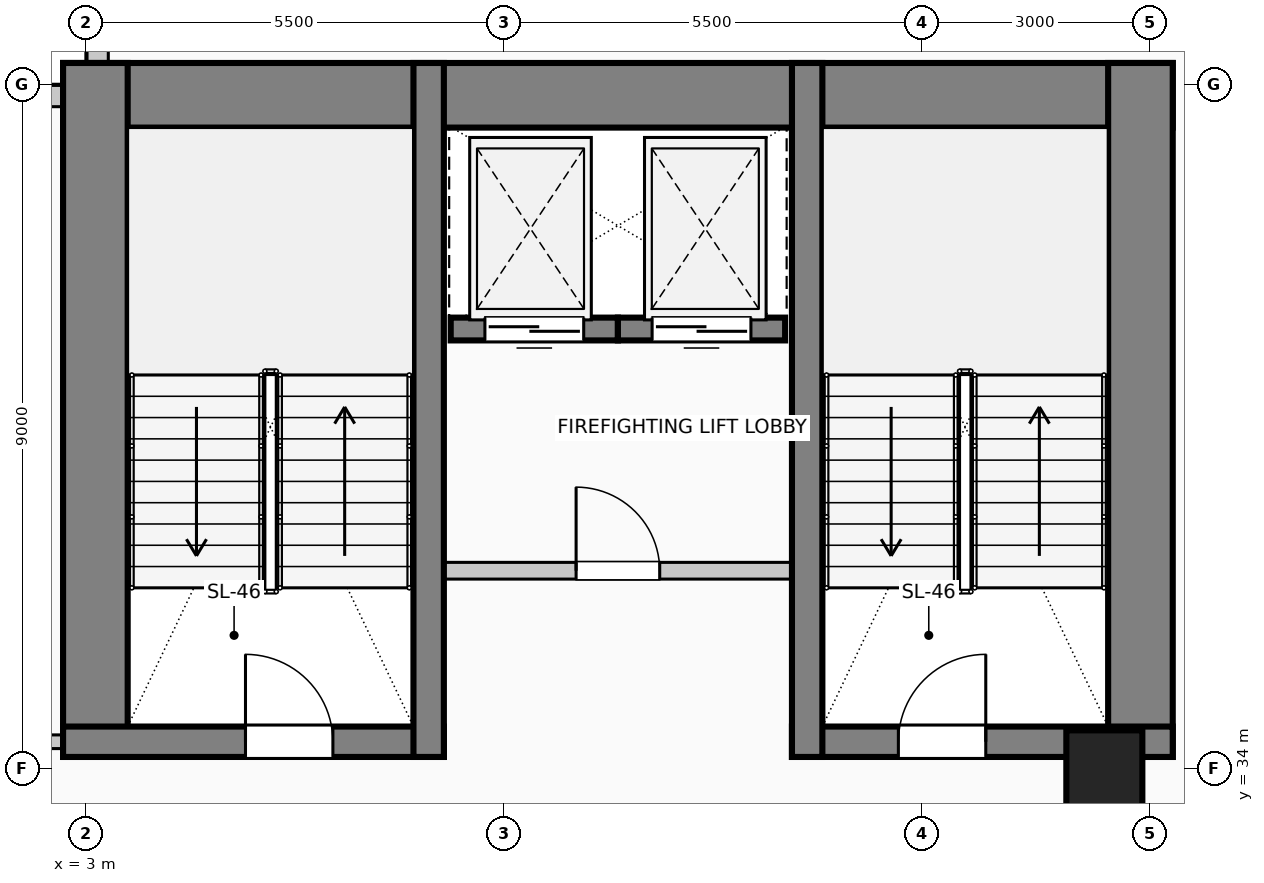
"""IFC4 building model, lengths in metres.
Left out: names, types, materials, properties, quantities, classifications, styles, units other than length and angle.
Written with IfcOpenShell. Run it as: python <this file> out.ifc"""

import sys

from ifc_helpers import new_model, si_unit, direction, frame, frame_2d, origin, origin_2d, place, context, subcontext, project, spatial, rectangle, circle, extrude, element, fill, save


model = new_model("IFC4")
c1 = context("Model", 3, precision=1e-05, world=origin(), true_north=direction((0.0, 1.0)))
c2 = subcontext(c1, "Body", "Model", "MODEL_VIEW")
j1 = project(units=[si_unit("LENGTHUNIT", "METRE"), si_unit("PLANEANGLEUNIT", "RADIAN")], contexts=[c1])
p1 = place(None, origin())
s1 = spatial("IfcSite", under=j1, at=p1, CompositionType="ELEMENT")
p2 = place(p1, origin())
s2 = spatial("IfcBuilding", under=s1, at=p2, CompositionType="ELEMENT")
p3 = place(p2, frame((0.0, 0.0, 92.6)))
s3 = spatial("IfcBuildingStorey", under=s2, at=p3, CompositionType="ELEMENT", Elevation=92.6)
p4 = place(p3, frame((2.7, 42.855, 0.0), z_axis=(0.0, 0.0, 1.0), x_axis=(1.0, 0.0, 0.0)))
e1 = element("IfcWall", 1, at=p4, inside=s3, PredefinedType="SHEAR", context=c2, shape_type="SweptSolid", body=[
    extrude(rectangle(XDim=14.6, YDim=0.85, at=frame_2d((7.3, 0.0))), origin(), (0.0, 0.0, 1.0), 4.0),
])
for number, where, z_axis, x_axis in (
    (2, (3.125, 34.15, 0.0), (0.0, 0.0, 1.0), (0.0, 1.0, 0.0)),
    (3, (16.875, 34.15, 0.0), (0.0, 0.0, 1.0), (0.0, 1.0, 0.0)),
):
    element("IfcWall", number, at=place(p3, frame(where, z_axis=z_axis, x_axis=x_axis)), inside=s3, PredefinedType="SHEAR", context=c2, shape_type="SweptSolid", body=[
        extrude(rectangle(XDim=9.13, YDim=0.85, at=frame_2d((4.565, 0.0))), origin(), (0.0, 0.0, 1.0), 4.0),
    ])
p5 = place(p3, frame((2.7, 34.35, 0.0), z_axis=(0.0, 0.0, 1.0), x_axis=(1.0, 0.0, 0.0)))
e4 = element("IfcWall", 4, at=p5, inside=s3, PredefinedType="SHEAR", context=c2, shape_type="SweptSolid", body=[
    extrude(rectangle(XDim=5.01, YDim=0.4, at=frame_2d((2.505, 0.0))), origin(), (0.0, 0.0, 1.0), 4.0),
])
p6 = place(p5, frame((2.4, 0.0, 0.0)))
e5 = element("IfcOpeningElement", 5, at=p6, cuts=e4, PredefinedType="OPENING", context=c2, shape_type="SweptSolid", body=[
    extrude(rectangle(XDim=1.15, YDim=2.2, at=frame_2d((0.575, 1.1))), frame((0.0, 0.21, 0.0), z_axis=(0.0, -1.0, 0.0), x_axis=(1.0, 0.0, 0.0)), (0.0, 0.0, 1.0), 0.42),
])
p7 = place(p3, frame((12.29, 34.35, 0.0), z_axis=(0.0, 0.0, 1.0), x_axis=(1.0, 0.0, 0.0)))
e6 = element("IfcWall", 6, at=p7, inside=s3, PredefinedType="SHEAR", context=c2, shape_type="SweptSolid", body=[
    extrude(rectangle(XDim=5.01, YDim=0.4, at=frame_2d((2.505, 0.0))), origin(), (0.0, 0.0, 1.0), 4.0),
])
p8 = place(p7, frame((1.4, 0.0, 0.0)))
e7 = element("IfcOpeningElement", 7, at=p8, cuts=e6, PredefinedType="OPENING", context=c2, shape_type="SweptSolid", body=[
    extrude(rectangle(XDim=1.15, YDim=2.2, at=frame_2d((0.575, 1.1))), frame((0.0, 0.21, 0.0), z_axis=(0.0, -1.0, 0.0), x_axis=(1.0, 0.0, 0.0)), (0.0, 0.0, 1.0), 0.42),
])
for number, where, z_axis, x_axis in (
    (8, (7.51, 34.15, 0.0), (0.0, 0.0, 1.0), (0.0, 1.0, 0.0)),
    (9, (12.49, 34.15, 0.0), (0.0, 0.0, 1.0), (0.0, 1.0, 0.0)),
):
    element("IfcWall", number, at=place(p3, frame(where, z_axis=z_axis, x_axis=x_axis)), inside=s3, PredefinedType="SHEAR", context=c2, shape_type="SweptSolid", body=[
        extrude(rectangle(XDim=9.13, YDim=0.4, at=frame_2d((4.565, 0.0))), origin(), (0.0, 0.0, 1.0), 4.0),
    ])
p9 = place(p3, frame((16.4, 34.0, 0.0), z_axis=(0.0, 0.0, 1.0), x_axis=(1.0, 0.0, 0.0)))
e10 = element("IfcColumn", 10, at=p9, inside=s3, PredefinedType="COLUMN", context=c2, shape_type="SweptSolid", body=[
    extrude(circle(Radius=0.5, at=origin_2d()), origin(), (0.0, 0.0, 1.0), 4.0),
])
p10 = place(p3, frame((0.6, 42.845, 0.0), z_axis=(0.0, 0.0, 1.0), x_axis=(1.0, 0.0, 0.0)))
e11 = element("IfcWall", 11, at=p10, inside=s3, PredefinedType="SOLIDWALL", context=c2, shape_type="SweptSolid", body=[
    extrude(rectangle(XDim=2.095, YDim=0.28, at=frame_2d((1.047, 0.0))), origin(), (0.0, 0.0, 1.0), 3.725),
])
p11 = place(p3, frame((3.155, 43.285, 0.0), z_axis=(0.0, 0.0, 1.0), x_axis=(0.0, 1.0, 0.0)))
e12 = element("IfcWall", 12, at=p11, inside=s3, PredefinedType="SOLIDWALL", context=c2, shape_type="SweptSolid", body=[
    extrude(rectangle(XDim=2.115, YDim=0.28, at=frame_2d((1.058, 0.0))), origin(), (0.0, 0.0, 1.0), 3.725),
])
p12 = place(p3, frame((10.0, 39.78, 0.0), z_axis=(0.0, 0.0, 1.0), x_axis=(-1.0, 0.0, 0.0)))
e13 = element("IfcWall", 13, at=p12, inside=s3, PredefinedType="SOLIDWALL", context=c2, shape_type="SweptSolid", body=[
    extrude(rectangle(XDim=2.2, YDim=0.3, at=frame_2d((1.1, 0.0))), origin(), (0.0, 0.0, 1.0), 4.0),
])
p13 = place(p12, frame((0.45, 0.0, 0.0)))
e14 = element("IfcOpeningElement", 14, at=p13, cuts=e13, PredefinedType="OPENING", context=c2, shape_type="SweptSolid", body=[
    extrude(rectangle(XDim=1.3, YDim=2.25, at=frame_2d((0.65, 1.125))), frame((0.0, 0.16, 0.0), z_axis=(0.0, -1.0, 0.0), x_axis=(1.0, 0.0, 0.0)), (0.0, 0.0, 1.0), 0.32),
])
p14 = place(p3, frame((12.2, 39.78, 0.0), z_axis=(0.0, 0.0, 1.0), x_axis=(-1.0, 0.0, 0.0)))
e15 = element("IfcWall", 15, at=p14, inside=s3, PredefinedType="SOLIDWALL", context=c2, shape_type="SweptSolid", body=[
    extrude(rectangle(XDim=2.2, YDim=0.3, at=frame_2d((1.1, 0.0))), origin(), (0.0, 0.0, 1.0), 4.0),
])
p15 = place(p14, frame((0.45, 0.0, 0.0)))
e16 = element("IfcOpeningElement", 16, at=p15, cuts=e15, PredefinedType="OPENING", context=c2, shape_type="SweptSolid", body=[
    extrude(rectangle(XDim=1.3, YDim=2.25, at=frame_2d((0.65, 1.125))), frame((0.0, 0.16, 0.0), z_axis=(0.0, -1.0, 0.0), x_axis=(1.0, 0.0, 0.0)), (0.0, 0.0, 1.0), 0.32),
])
p16 = place(p3, frame((7.51, 36.6, 0.0), z_axis=(0.0, 0.0, 1.0), x_axis=(1.0, 0.0, 0.0)))
e17 = element("IfcWall", 17, at=p16, inside=s3, PredefinedType="PARTITIONING", context=c2, shape_type="SweptSolid", body=[
    extrude(rectangle(XDim=4.98, YDim=0.22, at=frame_2d((2.49, 0.0))), origin(), (0.0, 0.0, 1.0), 3.725),
])
p17 = place(p16, frame((1.94, 0.0, 0.0)))
e18 = element("IfcOpeningElement", 18, at=p17, cuts=e17, PredefinedType="OPENING", context=c2, shape_type="SweptSolid", body=[
    extrude(rectangle(XDim=1.1, YDim=2.2, at=frame_2d((0.55, 1.1))), frame((0.0, 0.12, 0.0), z_axis=(0.0, -1.0, 0.0), x_axis=(1.0, 0.0, 0.0)), (0.0, 0.0, 1.0), 0.24),
])
p18 = place(p3, frame((1.175, 34.35, 0.0), z_axis=(0.0, 0.0, 1.0), x_axis=(1.0, 0.0, 0.0)))
e19 = element("IfcWall", 19, at=p18, inside=s3, PredefinedType="PARTITIONING", context=c2, shape_type="SweptSolid", body=[
    extrude(rectangle(XDim=1.525, YDim=0.18, at=frame_2d((0.762, 0.0))), origin(), (0.0, 0.0, 1.0), 3.725),
])
p19 = place(p13, origin())
e20 = element("IfcDoor", 20, at=p19, inside=s3, OperationType="SLIDING_TO_LEFT", PredefinedType="DOOR", context=c2, shape_type="SweptSolid", body=[
    extrude(rectangle(XDim=1.3, YDim=2.25, at=frame_2d((0.65, 1.125))), frame((0.0, 0.025, 0.0), z_axis=(0.0, -1.0, 0.0), x_axis=(1.0, 0.0, 0.0)), (0.0, 0.0, 1.0), 0.05),
])
fill(e14, e20)
p20 = place(p15, origin())
e21 = element("IfcDoor", 21, at=p20, inside=s3, OperationType="SLIDING_TO_RIGHT", PredefinedType="DOOR", context=c2, shape_type="SweptSolid", body=[
    extrude(rectangle(XDim=1.3, YDim=2.25, at=frame_2d((0.65, 1.125))), frame((0.0, 0.025, 0.0), z_axis=(0.0, -1.0, 0.0), x_axis=(1.0, 0.0, 0.0)), (0.0, 0.0, 1.0), 0.05),
])
fill(e16, e21)
p21 = place(p6, origin())
e22 = element("IfcDoor", 22, at=p21, inside=s3, OperationType="SINGLE_SWING_LEFT", PredefinedType="DOOR", context=c2, shape_type="SweptSolid", body=[
    extrude(rectangle(XDim=1.15, YDim=2.2, at=frame_2d((0.575, 1.1))), frame((0.0, 0.025, 0.0), z_axis=(0.0, -1.0, 0.0), x_axis=(1.0, 0.0, 0.0)), (0.0, 0.0, 1.0), 0.05),
])
fill(e5, e22)
p22 = place(p8, origin())
e23 = element("IfcDoor", 23, at=p22, inside=s3, OperationType="SINGLE_SWING_RIGHT", PredefinedType="DOOR", context=c2, shape_type="SweptSolid", body=[
    extrude(rectangle(XDim=1.15, YDim=2.2, at=frame_2d((0.575, 1.1))), frame((0.0, 0.025, 0.0), z_axis=(0.0, -1.0, 0.0), x_axis=(1.0, 0.0, 0.0)), (0.0, 0.0, 1.0), 0.05),
])
fill(e7, e23)
p23 = place(p17, origin())
e24 = element("IfcDoor", 24, at=p23, inside=s3, OperationType="SINGLE_SWING_LEFT", PredefinedType="DOOR", context=c2, shape_type="SweptSolid", body=[
    extrude(rectangle(XDim=1.1, YDim=2.2, at=frame_2d((0.55, 1.1))), frame((0.0, 0.025, 0.0), z_axis=(0.0, -1.0, 0.0), x_axis=(1.0, 0.0, 0.0)), (0.0, 0.0, 1.0), 0.05),
])
fill(e18, e24)
save(model, sys.argv[1])
